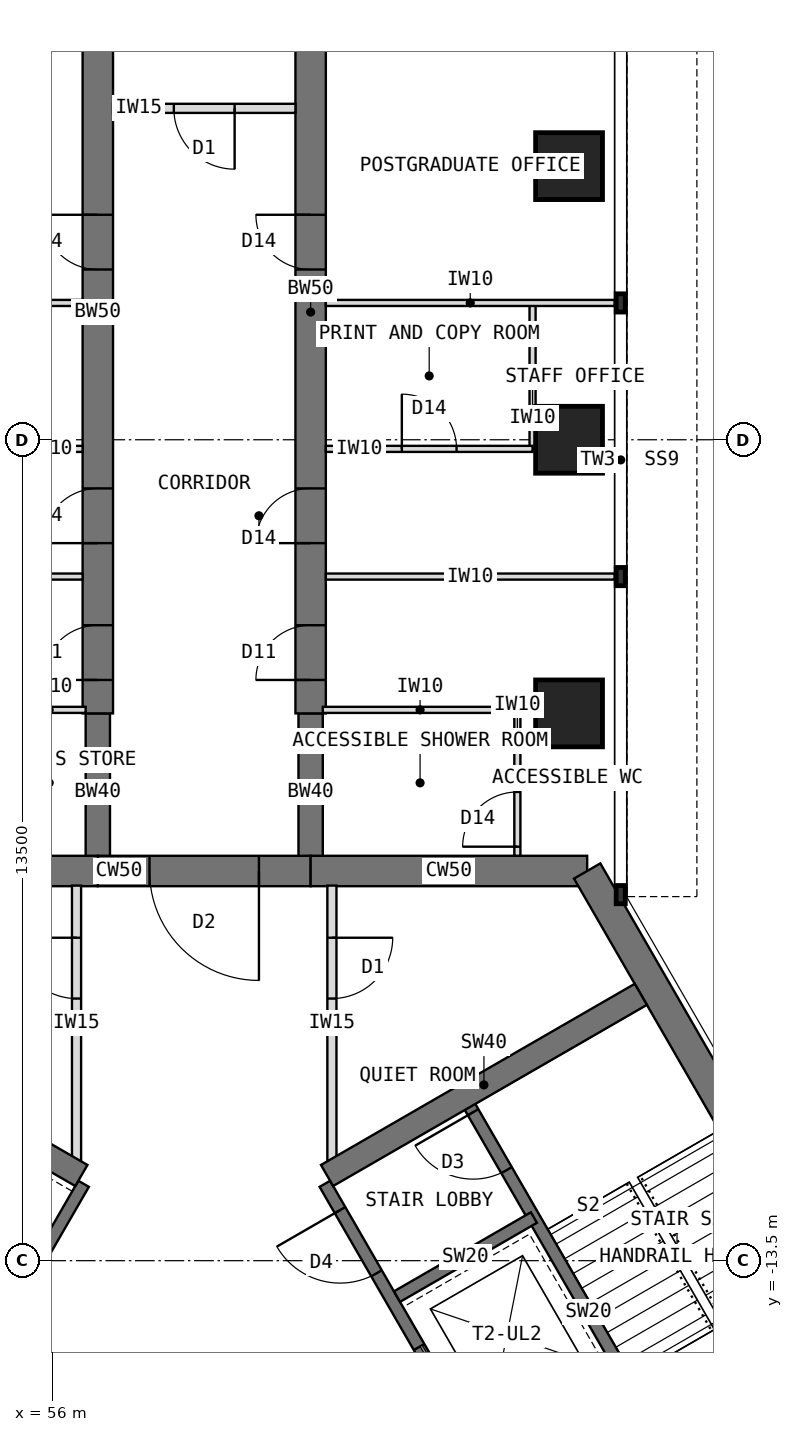
"""IFC4 building model, lengths in metres.
Left out: names, types, materials, properties, quantities, classifications, styles, units other than length and angle.
Written with IfcOpenShell. Run it as: python <this file> out.ifc"""

import sys

from ifc_helpers import new_model, si_unit, direction, frame, frame_2d, origin, origin_2d, place, context, subcontext, project, spatial, rectangle, extrude, element, fill, save


model = new_model("IFC4")
c1 = context("Model", 3, precision=1e-05, world=origin(), true_north=direction((0.0, 1.0)))
c2 = subcontext(c1, "Body", "Model", "MODEL_VIEW")
j1 = project(units=[si_unit("LENGTHUNIT", "METRE"), si_unit("PLANEANGLEUNIT", "RADIAN")], contexts=[c1])
p1 = place(None, origin())
s1 = spatial("IfcSite", under=j1, at=p1, CompositionType="ELEMENT")
p2 = place(p1, origin())
s2 = spatial("IfcBuilding", under=s1, at=p2, CompositionType="ELEMENT")
p3 = place(p2, frame((0.0, 0.0, 230.5)))
s3 = spatial("IfcBuildingStorey", under=s2, at=p3, CompositionType="ELEMENT", Elevation=230.5)
p4 = place(p3, frame((64.798, -7.092, 0.0), z_axis=(0.0, 0.0, 1.0), x_axis=(-1.0, 0.0, 0.0)))
e1 = element("IfcWall", 1, at=p4, inside=s3, PredefinedType="SHEAR", context=c2, shape_type="SweptSolid", body=[
    extrude(rectangle(XDim=4.548, YDim=0.5, at=frame_2d((2.274, 0.0))), origin(), (0.0, 0.0, 1.0), 4.0),
])
p5 = place(p3, frame((60.25, -7.092, 0.0), z_axis=(0.0, 0.0, 1.0), x_axis=(-1.0, 0.0, 0.0)))
e2 = element("IfcWall", 2, at=p5, inside=s3, PredefinedType="SHEAR", context=c2, shape_type="SweptSolid", body=[
    extrude(rectangle(XDim=3.5, YDim=0.5, at=frame_2d((1.75, 0.0))), origin(), (0.0, 0.0, 1.0), 4.0),
])
p6 = place(p5, frame((0.85, 0.0, 0.0)))
e3 = element("IfcOpeningElement", 3, at=p6, cuts=e2, PredefinedType="OPENING", context=c2, shape_type="SweptSolid", body=[
    extrude(rectangle(XDim=1.8, YDim=2.1, at=frame_2d((0.9, 1.05))), frame((0.0, 0.26, 0.0), z_axis=(0.0, -1.0, 0.0), x_axis=(1.0, 0.0, 0.0)), (0.0, 0.0, 1.0), 0.52),
])
p7 = place(p3, frame((56.75, -7.092, 0.0), z_axis=(0.0, 0.0, 1.0), x_axis=(-1.0, 0.0, 0.0)))
e4 = element("IfcWall", 4, at=p7, inside=s3, PredefinedType="SHEAR", context=c2, shape_type="SweptSolid", body=[
    extrude(rectangle(XDim=4.548, YDim=0.5, at=frame_2d((2.274, 0.0))), origin(), (0.0, 0.0, 1.0), 4.0),
])
p8 = place(p3, frame((71.096, -18.0, 0.0), z_axis=(0.0, 0.0, 1.0), x_axis=(-0.500005998175, 0.866021940709, 0.0)))
e5 = element("IfcWall", 5, at=p8, inside=s3, PredefinedType="SHEAR", context=c2, shape_type="SweptSolid", body=[
    extrude(rectangle(XDim=12.596, YDim=0.5, at=frame_2d((6.298, 0.0))), origin(), (0.0, 0.0, 1.0), 4.0),
])
p9 = place(p3, frame((56.75, -7.092, 0.0), z_axis=(0.0, 0.0, 1.0), x_axis=(0.0, 1.0, 0.0)))
e6 = element("IfcWall", 6, at=p9, inside=s3, PredefinedType="SHEAR", context=c2, shape_type="SweptSolid", body=[
    extrude(rectangle(XDim=2.592, YDim=0.4, at=frame_2d((1.296, 0.0))), origin(), (0.0, 0.0, 1.0), 4.0),
])
p10 = place(p3, frame((56.75, -4.5, 0.0), z_axis=(0.0, 0.0, 1.0), x_axis=(0.0, 1.0, 0.0)))
e7 = element("IfcWall", 7, at=p10, inside=s3, PredefinedType="SHEAR", context=c2, shape_type="SweptSolid", body=[
    extrude(rectangle(XDim=13.2, YDim=0.5, at=frame_2d((6.6, 0.0))), origin(), (0.0, 0.0, 1.0), 4.0),
])
p11 = place(p10, frame((0.55, 0.0, 0.0)))
e8 = element("IfcOpeningElement", 8, at=p11, cuts=e7, PredefinedType="OPENING", context=c2, shape_type="SweptSolid", body=[
    extrude(rectangle(XDim=0.9, YDim=2.1, at=frame_2d((0.45, 1.05))), frame((0.0, 0.26, 0.0), z_axis=(0.0, -1.0, 0.0), x_axis=(1.0, 0.0, 0.0)), (0.0, 0.0, 1.0), 0.52),
])
p12 = place(p10, frame((2.8, 0.0, 0.0)))
e9 = element("IfcOpeningElement", 9, at=p12, cuts=e7, PredefinedType="OPENING", context=c2, shape_type="SweptSolid", body=[
    extrude(rectangle(XDim=0.9, YDim=2.1, at=frame_2d((0.45, 1.05))), frame((0.0, 0.26, 0.0), z_axis=(0.0, -1.0, 0.0), x_axis=(1.0, 0.0, 0.0)), (0.0, 0.0, 1.0), 0.52),
])
p13 = place(p10, frame((7.3, 0.0, 0.0)))
e10 = element("IfcOpeningElement", 10, at=p13, cuts=e7, PredefinedType="OPENING", context=c2, shape_type="SweptSolid", body=[
    extrude(rectangle(XDim=0.9, YDim=2.1, at=frame_2d((0.45, 1.05))), frame((0.0, 0.26, 0.0), z_axis=(0.0, -1.0, 0.0), x_axis=(1.0, 0.0, 0.0)), (0.0, 0.0, 1.0), 0.52),
])
p14 = place(p3, frame((60.25, -7.092, 0.0), z_axis=(0.0, 0.0, 1.0), x_axis=(0.0, 1.0, 0.0)))
e11 = element("IfcWall", 11, at=p14, inside=s3, PredefinedType="SHEAR", context=c2, shape_type="SweptSolid", body=[
    extrude(rectangle(XDim=2.592, YDim=0.4, at=frame_2d((1.296, 0.0))), origin(), (0.0, 0.0, 1.0), 4.0),
])
p15 = place(p3, frame((60.25, -4.5, 0.0), z_axis=(0.0, 0.0, 1.0), x_axis=(0.0, 1.0, 0.0)))
e12 = element("IfcWall", 12, at=p15, inside=s3, PredefinedType="SHEAR", context=c2, shape_type="SweptSolid", body=[
    extrude(rectangle(XDim=13.2, YDim=0.5, at=frame_2d((6.6, 0.0))), origin(), (0.0, 0.0, 1.0), 4.0),
])
p16 = place(p15, frame((0.55, 0.0, 0.0)))
e13 = element("IfcOpeningElement", 13, at=p16, cuts=e12, PredefinedType="OPENING", context=c2, shape_type="SweptSolid", body=[
    extrude(rectangle(XDim=0.9, YDim=2.1, at=frame_2d((0.45, 1.05))), frame((0.0, 0.26, 0.0), z_axis=(0.0, -1.0, 0.0), x_axis=(1.0, 0.0, 0.0)), (0.0, 0.0, 1.0), 0.52),
])
p17 = place(p15, frame((2.8, 0.0, 0.0)))
e14 = element("IfcOpeningElement", 14, at=p17, cuts=e12, PredefinedType="OPENING", context=c2, shape_type="SweptSolid", body=[
    extrude(rectangle(XDim=0.9, YDim=2.1, at=frame_2d((0.45, 1.05))), frame((0.0, 0.26, 0.0), z_axis=(0.0, -1.0, 0.0), x_axis=(1.0, 0.0, 0.0)), (0.0, 0.0, 1.0), 0.52),
])
p18 = place(p15, frame((7.3, 0.0, 0.0)))
e15 = element("IfcOpeningElement", 15, at=p18, cuts=e12, PredefinedType="OPENING", context=c2, shape_type="SweptSolid", body=[
    extrude(rectangle(XDim=0.9, YDim=2.1, at=frame_2d((0.45, 1.05))), frame((0.0, 0.26, 0.0), z_axis=(0.0, -1.0, 0.0), x_axis=(1.0, 0.0, 0.0)), (0.0, 0.0, 1.0), 0.52),
])
for number, where, z_axis, x_axis in (
    (16, (64.5, -4.5, 0.0), (0.0, 0.0, 1.0), (1.0, 0.0, 0.0)),
    (17, (64.5, 0.0, 0.0), (0.0, 0.0, 1.0), (1.0, 0.0, 0.0)),
    (18, (64.5, 4.5, 0.0), (0.0, 0.0, 1.0), (1.0, 0.0, 0.0)),
):
    element("IfcColumn", number, at=place(p3, frame(where, z_axis=z_axis, x_axis=x_axis)), inside=s3, PredefinedType="COLUMN", context=c2, shape_type="SweptSolid", body=[
        extrude(rectangle(XDim=1.1, YDim=1.1, at=origin_2d()), origin(), (0.0, 0.0, 1.0), 4.0),
    ])
p19 = place(p3, frame((56.516, -12.236, 0.0), z_axis=(0.0, 0.0, 1.0), x_axis=(-0.49999894854, -0.866026010844, 0.0)))
e19 = element("IfcWall", 19, at=p19, inside=s3, PredefinedType="SHEAR", context=c2, shape_type="SweptSolid", body=[
    extrude(rectangle(XDim=8.0, YDim=0.2, at=frame_2d((4.0, 0.0))), origin(), (0.0, 0.0, 1.0), 4.0),
])
p20 = place(p19, frame((6.3, 0.0, 0.0)))
e20 = element("IfcOpeningElement", 20, at=p20, cuts=e19, PredefinedType="OPENING", context=c2, shape_type="SweptSolid", body=[
    extrude(rectangle(XDim=1.2, YDim=2.1, at=frame_2d((0.6, 1.05))), frame((0.0, 0.11, 0.0), z_axis=(0.0, -1.0, 0.0), x_axis=(1.0, 0.0, 0.0)), (0.0, 0.0, 1.0), 0.22),
])
p21 = place(p3, frame((56.48, -12.099, 0.0), z_axis=(0.0, 0.0, 1.0), x_axis=(-0.86602319114, 0.500003832394, 0.0)))
e21 = element("IfcWall", 21, at=p21, inside=s3, PredefinedType="SHEAR", context=c2, shape_type="SweptSolid", body=[
    extrude(rectangle(XDim=5.958, YDim=0.4, at=frame_2d((2.979, 0.0))), origin(), (0.0, 0.0, 1.0), 4.0),
])
p22 = place(p3, frame((64.484, -19.164, 0.0), z_axis=(0.0, 0.0, 1.0), x_axis=(-0.49999894854, 0.866026010844, 0.0)))
e22 = element("IfcWall", 22, at=p22, inside=s3, PredefinedType="SHEAR", context=c2, shape_type="SweptSolid", body=[
    extrude(rectangle(XDim=8.0, YDim=0.2, at=frame_2d((4.0, 0.0))), origin(), (0.0, 0.0, 1.0), 4.0),
])
p23 = place(p22, frame((6.3, 0.0, 0.0)))
e23 = element("IfcOpeningElement", 23, at=p23, cuts=e22, PredefinedType="OPENING", context=c2, shape_type="SweptSolid", body=[
    extrude(rectangle(XDim=1.2, YDim=2.1, at=frame_2d((0.6, 1.05))), frame((0.0, 0.11, 0.0), z_axis=(0.0, -1.0, 0.0), x_axis=(1.0, 0.0, 0.0)), (0.0, 0.0, 1.0), 0.22),
])
p24 = place(p22, frame((0.9, 0.0, 0.0)))
e24 = element("IfcOpeningElement", 24, at=p24, cuts=e22, PredefinedType="OPENING", context=c2, shape_type="SweptSolid", body=[
    extrude(rectangle(XDim=1.1, YDim=2.2, at=frame_2d((0.55, 1.1))), frame((0.0, 0.11, 0.0), z_axis=(0.0, -1.0, 0.0), x_axis=(1.0, 0.0, 0.0)), (0.0, 0.0, 1.0), 0.22),
])
p25 = place(p22, frame((3.8, 0.0, 0.0)))
e25 = element("IfcOpeningElement", 25, at=p25, cuts=e22, PredefinedType="OPENING", context=c2, shape_type="SweptSolid", body=[
    extrude(rectangle(XDim=1.1, YDim=2.2, at=frame_2d((0.55, 1.1))), frame((0.0, 0.11, 0.0), z_axis=(0.0, -1.0, 0.0), x_axis=(1.0, 0.0, 0.0)), (0.0, 0.0, 1.0), 0.22),
])
p26 = place(p3, frame((61.67, -14.091, 0.0), z_axis=(0.0, 0.0, 1.0), x_axis=(0.86603858612, 0.49997716683, 0.0)))
e26 = element("IfcWall", 26, at=p26, inside=s3, PredefinedType="SHEAR", context=c2, shape_type="SweptSolid", body=[
    extrude(rectangle(XDim=2.6, YDim=0.2, at=frame_2d((1.3, 0.0))), origin(), (0.0, 0.0, 1.0), 4.0),
])
p27 = place(p3, frame((66.822, -17.814, 0.0), z_axis=(0.0, 0.0, 1.0), x_axis=(-0.49999894854, 0.866026010844, 0.0)))
e27 = element("IfcWall", 27, at=p27, inside=s3, PredefinedType="SHEAR", context=c2, shape_type="SweptSolid", body=[
    extrude(rectangle(XDim=8.0, YDim=0.2, at=frame_2d((4.0, 0.0))), origin(), (0.0, 0.0, 1.0), 4.0),
])
p28 = place(p27, frame((6.7, 0.0, 0.0)))
e28 = element("IfcOpeningElement", 28, at=p28, cuts=e27, PredefinedType="OPENING", context=c2, shape_type="SweptSolid", body=[
    extrude(rectangle(XDim=1.1, YDim=2.1, at=frame_2d((0.55, 1.05))), frame((0.0, 0.11, 0.0), z_axis=(0.0, -1.0, 0.0), x_axis=(1.0, 0.0, 0.0)), (0.0, 0.0, 1.0), 0.22),
])
p29 = place(p3, frame((60.52, -12.099, 0.0), z_axis=(0.0, 0.0, 1.0), x_axis=(0.86602319114, 0.500003832394, 0.0)))
e29 = element("IfcWall", 29, at=p29, inside=s3, PredefinedType="SHEAR", context=c2, shape_type="SweptSolid", body=[
    extrude(rectangle(XDim=5.958, YDim=0.4, at=frame_2d((2.979, 0.0))), origin(), (0.0, 0.0, 1.0), 4.0),
])
for number, where, z_axis, x_axis in (
    (30, (56.5, -2.25, 0.0), (0.0, 0.0, 1.0), (-1.0, 0.0, 0.0)),
    (31, (56.5, 2.25, 0.0), (0.0, 0.0, 1.0), (-1.0, 0.0, 0.0)),
):
    element("IfcWall", number, at=place(p3, frame(where, z_axis=z_axis, x_axis=x_axis)), inside=s3, PredefinedType="PARTITIONING", context=c2, shape_type="SweptSolid", body=[
        extrude(rectangle(XDim=4.75, YDim=0.1, at=frame_2d((2.375, 0.0))), origin(), (0.0, 0.0, 1.0), 3.8),
    ])
p30 = place(p3, frame((56.5, -0.15, 0.0), z_axis=(0.0, 0.0, 1.0), x_axis=(-1.0, 0.0, 0.0)))
e32 = element("IfcWall", 32, at=p30, inside=s3, PredefinedType="PARTITIONING", context=c2, shape_type="SweptSolid", body=[
    extrude(rectangle(XDim=3.4, YDim=0.1, at=frame_2d((1.7, 0.0))), origin(), (0.0, 0.0, 1.0), 3.8),
])
p31 = place(p30, frame((1.25, 0.0, 0.0)))
e33 = element("IfcOpeningElement", 33, at=p31, cuts=e32, PredefinedType="OPENING", context=c2, shape_type="SweptSolid", body=[
    extrude(rectangle(XDim=0.9, YDim=2.1, at=frame_2d((0.45, 1.05))), frame((0.0, 0.06, 0.0), z_axis=(0.0, -1.0, 0.0), x_axis=(1.0, 0.0, 0.0)), (0.0, 0.0, 1.0), 0.12),
])
p32 = place(p3, frame((56.55, -4.442, 0.0), z_axis=(0.0, 0.0, 1.0), x_axis=(-1.0, 0.0, 0.0)))
e34 = element("IfcWall", 34, at=p32, inside=s3, PredefinedType="PARTITIONING", context=c2, shape_type="SweptSolid", body=[
    extrude(rectangle(XDim=1.2, YDim=0.1, at=frame_2d((0.6, 0.0))), origin(), (0.0, 0.0, 1.0), 3.267),
])
for number, where, z_axis, x_axis in (
    (35, (60.5, -2.25, 0.0), (0.0, 0.0, 1.0), (1.0, 0.0, 0.0)),
    (36, (60.5, 2.25, 0.0), (0.0, 0.0, 1.0), (1.0, 0.0, 0.0)),
):
    element("IfcWall", number, at=place(p3, frame(where, z_axis=z_axis, x_axis=x_axis)), inside=s3, PredefinedType="PARTITIONING", context=c2, shape_type="SweptSolid", body=[
        extrude(rectangle(XDim=4.75, YDim=0.1, at=frame_2d((2.375, 0.0))), origin(), (0.0, 0.0, 1.0), 3.8),
    ])
p33 = place(p3, frame((63.9, -0.15, 0.0), z_axis=(0.0, 0.0, 1.0), x_axis=(0.0, 1.0, 0.0)))
e37 = element("IfcWall", 37, at=p33, inside=s3, PredefinedType="PARTITIONING", context=c2, shape_type="SweptSolid", body=[
    extrude(rectangle(XDim=2.4, YDim=0.1, at=frame_2d((1.2, 0.0))), origin(), (0.0, 0.0, 1.0), 3.8),
])
p34 = place(p3, frame((60.5, -0.15, 0.0), z_axis=(0.0, 0.0, 1.0), x_axis=(1.0, 0.0, 0.0)))
e38 = element("IfcWall", 38, at=p34, inside=s3, PredefinedType="PARTITIONING", context=c2, shape_type="SweptSolid", body=[
    extrude(rectangle(XDim=3.4, YDim=0.1, at=frame_2d((1.7, 0.0))), origin(), (0.0, 0.0, 1.0), 3.8),
])
p35 = place(p34, frame((1.25, 0.0, 0.0)))
e39 = element("IfcOpeningElement", 39, at=p35, cuts=e38, PredefinedType="OPENING", context=c2, shape_type="SweptSolid", body=[
    extrude(rectangle(XDim=0.9, YDim=2.1, at=frame_2d((0.45, 1.05))), frame((0.0, 0.06, 0.0), z_axis=(0.0, -1.0, 0.0), x_axis=(1.0, 0.0, 0.0)), (0.0, 0.0, 1.0), 0.12),
])
p36 = place(p3, frame((63.65, -6.842, 0.0), z_axis=(0.0, 0.0, 1.0), x_axis=(0.0, 1.0, 0.0)))
e40 = element("IfcWall", 40, at=p36, inside=s3, PredefinedType="PARTITIONING", context=c2, shape_type="SweptSolid", body=[
    extrude(rectangle(XDim=2.4, YDim=0.1, at=frame_2d((1.2, 0.0))), origin(), (0.0, 0.0, 1.0), 3.8),
])
p37 = place(p36, frame((0.15, 0.0, 0.0)))
e41 = element("IfcOpeningElement", 41, at=p37, cuts=e40, PredefinedType="OPENING", context=c2, shape_type="SweptSolid", body=[
    extrude(rectangle(XDim=0.9, YDim=2.1, at=frame_2d((0.45, 1.05))), frame((0.0, 0.06, 0.0), z_axis=(0.0, -1.0, 0.0), x_axis=(1.0, 0.0, 0.0)), (0.0, 0.0, 1.0), 0.12),
])
p38 = place(p3, frame((60.45, -4.442, 0.0), z_axis=(0.0, 0.0, 1.0), x_axis=(1.0, 0.0, 0.0)))
e42 = element("IfcWall", 42, at=p38, inside=s3, PredefinedType="PARTITIONING", context=c2, shape_type="SweptSolid", body=[
    extrude(rectangle(XDim=3.2, YDim=0.1, at=frame_2d((1.6, 0.0))), origin(), (0.0, 0.0, 1.0), 3.267),
])
p39 = place(p3, frame((56.4, -11.857, 0.0), z_axis=(0.0, 0.0, 1.0), x_axis=(0.0, 1.0, 0.0)))
e43 = element("IfcWall", 43, at=p39, inside=s3, PredefinedType="PARTITIONING", context=c2, shape_type="SweptSolid", body=[
    extrude(rectangle(XDim=4.526, YDim=0.15, at=frame_2d((2.263, 0.0))), origin(), (0.0, 0.0, 1.0), 3.8),
])
p40 = place(p39, frame((2.668, 0.0, 0.0)))
e44 = element("IfcOpeningElement", 44, at=p40, cuts=e43, PredefinedType="OPENING", context=c2, shape_type="SweptSolid", body=[
    extrude(rectangle(XDim=1.0, YDim=2.1, at=frame_2d((0.5, 1.05))), frame((0.0, 0.085, 0.0), z_axis=(0.0, -1.0, 0.0), x_axis=(1.0, 0.0, 0.0)), (0.0, 0.0, 1.0), 0.17),
])
p41 = place(p3, frame((60.6, -7.332, 0.0), z_axis=(0.0, 0.0, 1.0), x_axis=(0.0, -1.0, 0.0)))
e45 = element("IfcWall", 45, at=p41, inside=s3, PredefinedType="PARTITIONING", context=c2, shape_type="SweptSolid", body=[
    extrude(rectangle(XDim=4.526, YDim=0.15, at=frame_2d((2.263, 0.0))), origin(), (0.0, 0.0, 1.0), 3.8),
])
p42 = place(p41, frame((0.858, 0.0, 0.0)))
e46 = element("IfcOpeningElement", 46, at=p42, cuts=e45, PredefinedType="OPENING", context=c2, shape_type="SweptSolid", body=[
    extrude(rectangle(XDim=1.0, YDim=2.1, at=frame_2d((0.5, 1.05))), frame((0.0, 0.085, 0.0), z_axis=(0.0, -1.0, 0.0), x_axis=(1.0, 0.0, 0.0)), (0.0, 0.0, 1.0), 0.17),
])
p43 = place(p3, frame((60.0, 5.45, 0.0), z_axis=(0.0, 0.0, 1.0), x_axis=(-1.0, 0.0, 0.0)))
e47 = element("IfcWall", 47, at=p43, inside=s3, PredefinedType="PARTITIONING", context=c2, shape_type="SweptSolid", body=[
    extrude(rectangle(XDim=3.0, YDim=0.15, at=frame_2d((1.5, 0.0))), origin(), (0.0, 0.0, 1.0), 3.8),
])
p44 = place(p43, frame((1.0, 0.0, 0.0)))
e48 = element("IfcOpeningElement", 48, at=p44, cuts=e47, PredefinedType="OPENING", context=c2, shape_type="SweptSolid", body=[
    extrude(rectangle(XDim=1.0, YDim=2.1, at=frame_2d((0.5, 1.05))), frame((0.0, 0.085, 0.0), z_axis=(0.0, -1.0, 0.0), x_axis=(1.0, 0.0, 0.0)), (0.0, 0.0, 1.0), 0.17),
])
p45 = place(p23, origin())
e49 = element("IfcDoor", 49, at=p45, inside=s3, OperationType="SINGLE_SWING_RIGHT", PredefinedType="DOOR", context=c2, shape_type="SweptSolid", body=[
    extrude(rectangle(XDim=1.2, YDim=2.1, at=frame_2d((0.6, 1.05))), frame((0.0, 0.025, 0.0), z_axis=(0.0, -1.0, 0.0), x_axis=(1.0, 0.0, 0.0)), (0.0, 0.0, 1.0), 0.05),
])
fill(e23, e49)
p46 = place(p25, origin())
e50 = element("IfcDoor", 50, at=p46, inside=s3, OperationType="DOUBLE_DOOR_SLIDING", PredefinedType="DOOR", context=c2, shape_type="SweptSolid", body=[
    extrude(rectangle(XDim=1.1, YDim=2.2, at=frame_2d((0.55, 1.1))), frame((0.0, 0.025, 0.0), z_axis=(0.0, -1.0, 0.0), x_axis=(1.0, 0.0, 0.0)), (0.0, 0.0, 1.0), 0.05),
])
fill(e25, e50)
p47 = place(p28, origin())
e51 = element("IfcDoor", 51, at=p47, inside=s3, OperationType="SINGLE_SWING_RIGHT", PredefinedType="DOOR", context=c2, shape_type="SweptSolid", body=[
    extrude(rectangle(XDim=1.1, YDim=2.1, at=frame_2d((0.55, 1.05))), frame((0.0, 0.025, 0.0), z_axis=(0.0, -1.0, 0.0), x_axis=(1.0, 0.0, 0.0)), (0.0, 0.0, 1.0), 0.05),
])
fill(e28, e51)
p48 = place(p6, origin())
e52 = element("IfcDoor", 52, at=p48, inside=s3, OperationType="DOUBLE_DOOR_DOUBLE_SWING", PredefinedType="DOOR", context=c2, shape_type="SweptSolid", body=[
    extrude(rectangle(XDim=1.8, YDim=2.1, at=frame_2d((0.9, 1.05))), frame((0.0, 0.025, 0.0), z_axis=(0.0, -1.0, 0.0), x_axis=(1.0, 0.0, 0.0)), (0.0, 0.0, 1.0), 0.05),
])
fill(e3, e52)
p49 = place(p35, origin())
e53 = element("IfcDoor", 53, at=p49, inside=s3, OperationType="SINGLE_SWING_LEFT", PredefinedType="DOOR", context=c2, shape_type="SweptSolid", body=[
    extrude(rectangle(XDim=0.9, YDim=2.1, at=frame_2d((0.45, 1.05))), frame((0.0, 0.025, 0.0), z_axis=(0.0, -1.0, 0.0), x_axis=(1.0, 0.0, 0.0)), (0.0, 0.0, 1.0), 0.05),
])
fill(e39, e53)
p50 = place(p37, origin())
e54 = element("IfcDoor", 54, at=p50, inside=s3, OperationType="SINGLE_SWING_LEFT", PredefinedType="DOOR", context=c2, shape_type="SweptSolid", body=[
    extrude(rectangle(XDim=0.9, YDim=2.1, at=frame_2d((0.45, 1.05))), frame((0.0, 0.025, 0.0), z_axis=(0.0, -1.0, 0.0), x_axis=(1.0, 0.0, 0.0)), (0.0, 0.0, 1.0), 0.05),
])
fill(e41, e54)
p51 = place(p42, origin())
e55 = element("IfcDoor", 55, at=p51, inside=s3, OperationType="SINGLE_SWING_LEFT", PredefinedType="DOOR", context=c2, shape_type="SweptSolid", body=[
    extrude(rectangle(XDim=1.0, YDim=2.1, at=frame_2d((0.5, 1.05))), frame((0.0, 0.025, 0.0), z_axis=(0.0, -1.0, 0.0), x_axis=(1.0, 0.0, 0.0)), (0.0, 0.0, 1.0), 0.05),
])
fill(e46, e55)
p52 = place(p40, origin())
e56 = element("IfcDoor", 56, at=p52, inside=s3, OperationType="SINGLE_SWING_RIGHT", PredefinedType="DOOR", context=c2, shape_type="SweptSolid", body=[
    extrude(rectangle(XDim=1.0, YDim=2.1, at=frame_2d((0.5, 1.05))), frame((0.0, 0.025, 0.0), z_axis=(0.0, -1.0, 0.0), x_axis=(1.0, 0.0, 0.0)), (0.0, 0.0, 1.0), 0.05),
])
fill(e44, e56)
p53 = place(p44, origin())
e57 = element("IfcDoor", 57, at=p53, inside=s3, OperationType="SINGLE_SWING_LEFT", PredefinedType="DOOR", context=c2, shape_type="SweptSolid", body=[
    extrude(rectangle(XDim=1.0, YDim=2.1, at=frame_2d((0.5, 1.05))), frame((0.0, 0.025, 0.0), z_axis=(0.0, -1.0, 0.0), x_axis=(1.0, 0.0, 0.0)), (0.0, 0.0, 1.0), 0.05),
])
fill(e48, e57)
p54 = place(p11, origin())
e58 = element("IfcDoor", 58, at=p54, inside=s3, OperationType="SINGLE_SWING_LEFT", PredefinedType="DOOR", context=c2, shape_type="SweptSolid", body=[
    extrude(rectangle(XDim=0.9, YDim=2.1, at=frame_2d((0.45, 1.05))), frame((0.0, 0.025, 0.0), z_axis=(0.0, -1.0, 0.0), x_axis=(1.0, 0.0, 0.0)), (0.0, 0.0, 1.0), 0.05),
])
fill(e8, e58)
p55 = place(p12, origin())
e59 = element("IfcDoor", 59, at=p55, inside=s3, OperationType="SINGLE_SWING_LEFT", PredefinedType="DOOR", context=c2, shape_type="SweptSolid", body=[
    extrude(rectangle(XDim=0.9, YDim=2.1, at=frame_2d((0.45, 1.05))), frame((0.0, 0.025, 0.0), z_axis=(0.0, -1.0, 0.0), x_axis=(1.0, 0.0, 0.0)), (0.0, 0.0, 1.0), 0.05),
])
fill(e9, e59)
p56 = place(p13, origin())
e60 = element("IfcDoor", 60, at=p56, inside=s3, OperationType="SINGLE_SWING_RIGHT", PredefinedType="DOOR", context=c2, shape_type="SweptSolid", body=[
    extrude(rectangle(XDim=0.9, YDim=2.1, at=frame_2d((0.45, 1.05))), frame((0.0, 0.025, 0.0), z_axis=(0.0, -1.0, 0.0), x_axis=(1.0, 0.0, 0.0)), (0.0, 0.0, 1.0), 0.05),
])
fill(e10, e60)
p57 = place(p16, origin())
e61 = element("IfcDoor", 61, at=p57, inside=s3, OperationType="SINGLE_SWING_LEFT", PredefinedType="DOOR", context=c2, shape_type="SweptSolid", body=[
    extrude(rectangle(XDim=0.9, YDim=2.1, at=frame_2d((0.45, 1.05))), frame((0.0, 0.025, 0.0), z_axis=(0.0, -1.0, 0.0), x_axis=(1.0, 0.0, 0.0)), (0.0, 0.0, 1.0), 0.05),
])
fill(e13, e61)
p58 = place(p17, origin())
e62 = element("IfcDoor", 62, at=p58, inside=s3, OperationType="SINGLE_SWING_LEFT", PredefinedType="DOOR", context=c2, shape_type="SweptSolid", body=[
    extrude(rectangle(XDim=0.9, YDim=2.1, at=frame_2d((0.45, 1.05))), frame((0.0, 0.025, 0.0), z_axis=(0.0, -1.0, 0.0), x_axis=(1.0, 0.0, 0.0)), (0.0, 0.0, 1.0), 0.05),
])
fill(e14, e62)
p59 = place(p18, origin())
e63 = element("IfcDoor", 63, at=p59, inside=s3, OperationType="SINGLE_SWING_RIGHT", PredefinedType="DOOR", context=c2, shape_type="SweptSolid", body=[
    extrude(rectangle(XDim=0.9, YDim=2.1, at=frame_2d((0.45, 1.05))), frame((0.0, 0.025, 0.0), z_axis=(0.0, -1.0, 0.0), x_axis=(1.0, 0.0, 0.0)), (0.0, 0.0, 1.0), 0.05),
])
fill(e15, e63)
save(model, sys.argv[1])
